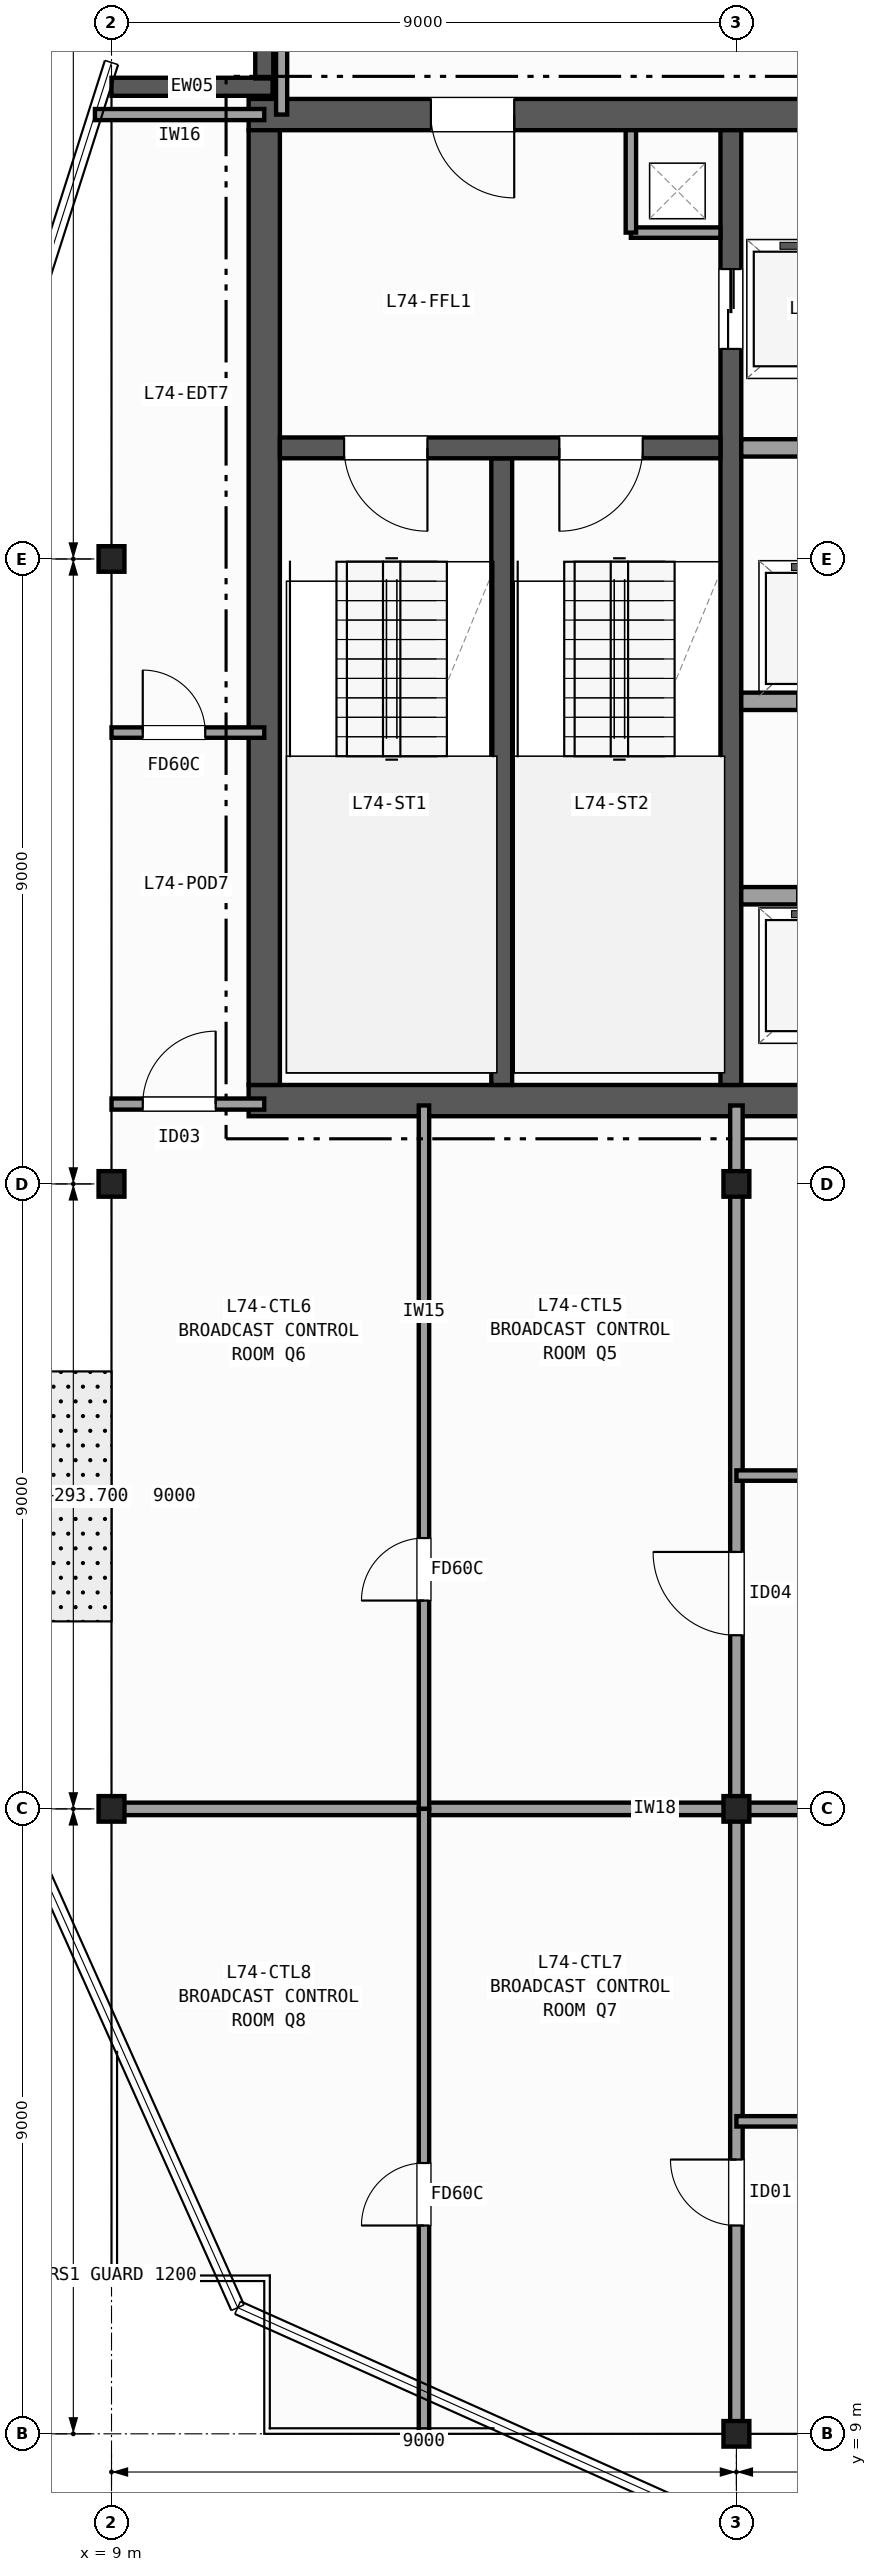
"""IFC4 building model, lengths in metres.
Left out: names, types, materials, properties, quantities, classifications, styles, units other than length and angle.
Written with IfcOpenShell. Run it as: python <this file> out.ifc"""

import sys

from ifc_helpers import new_model, si_unit, direction, frame, frame_2d, origin, origin_2d, place, context, subcontext, project, spatial, rectangle, i_section, extrude, element, fill, save


model = new_model("IFC4")
c1 = context("Model", 3, precision=1e-05, world=origin(), true_north=direction((0.0, 1.0)))
c2 = subcontext(c1, "Body", "Model", "MODEL_VIEW")
j1 = project(units=[si_unit("LENGTHUNIT", "METRE"), si_unit("PLANEANGLEUNIT", "RADIAN")], contexts=[c1])
p1 = place(None, origin())
s1 = spatial("IfcSite", under=j1, at=p1, CompositionType="ELEMENT")
p2 = place(p1, origin())
s2 = spatial("IfcBuilding", under=s1, at=p2, CompositionType="ELEMENT")
p3 = place(p2, frame((0.0, 0.0, 293.7)))
s3 = spatial("IfcBuildingStorey", under=s2, at=p3, CompositionType="ELEMENT", Elevation=293.7)
for number, where, z_axis, x_axis in (
    (1, (9.0, 18.0, 0.0), (0.0, 0.0, 1.0), (1.0, 0.0, 0.0)),
    (2, (9.0, 27.0, 0.0), (0.0, 0.0, 1.0), (1.0, 0.0, 0.0)),
    (3, (9.0, 36.0, 0.0), (0.0, 0.0, 1.0), (1.0, 0.0, 0.0)),
    (4, (18.0, 9.0, 0.0), (0.0, 0.0, 1.0), (1.0, 0.0, 0.0)),
    (5, (18.0, 18.0, 0.0), (0.0, 0.0, 1.0), (1.0, 0.0, 0.0)),
    (6, (18.0, 27.0, 0.0), (0.0, 0.0, 1.0), (1.0, 0.0, 0.0)),
):
    element("IfcColumn", number, at=place(p3, frame(where, z_axis=z_axis, x_axis=x_axis)), inside=s3, PredefinedType="COLUMN", context=c2, shape_type="SweptSolid", body=[
        extrude(i_section(OverallWidth=0.373, OverallDepth=0.368, WebThickness=0.015, FlangeThickness=0.024, FilletRadius=0.015, at=origin_2d()), origin(), (0.0, 0.0, 1.0), 3.7),
    ])
p4 = place(p3, frame((9.0, 42.8, 0.0), z_axis=(0.0, 0.0, 1.0), x_axis=(1.0, 0.0, 0.0)))
e7 = element("IfcWall", 7, at=p4, inside=s3, PredefinedType="SOLIDWALL", context=c2, shape_type="SweptSolid", body=[
    extrude(rectangle(XDim=2.32, YDim=0.26, at=frame_2d((1.16, 0.0))), origin(), (0.0, 0.0, 1.0), 3.37),
])
p5 = place(p3, frame((11.2, 42.92, 0.0), z_axis=(0.0, 0.0, 1.0), x_axis=(0.0, 1.0, 0.0)))
e8 = element("IfcWall", 8, at=p5, inside=s3, PredefinedType="SOLIDWALL", context=c2, shape_type="SweptSolid", body=[
    extrude(rectangle(XDim=2.08, YDim=0.26, at=frame_2d((1.04, 0.0))), origin(), (0.0, 0.0, 1.0), 3.37),
])
p6 = place(p3, frame((10.975, 28.2, 0.0), z_axis=(0.0, 0.0, 1.0), x_axis=(1.0, 0.0, 0.0)))
e9 = element("IfcWall", 9, at=p6, inside=s3, PredefinedType="SHEAR", context=c2, shape_type="SweptSolid", body=[
    extrude(rectangle(XDim=13.85, YDim=0.45, at=frame_2d((6.925, 0.0))), origin(), (0.0, 0.0, 1.0), 3.37),
])
p7 = place(p3, frame((24.825, 42.4, 0.0), z_axis=(0.0, 0.0, 1.0), x_axis=(-1.0, 0.0, 0.0)))
e10 = element("IfcWall", 10, at=p7, inside=s3, PredefinedType="SHEAR", context=c2, shape_type="SweptSolid", body=[
    extrude(rectangle(XDim=13.85, YDim=0.45, at=frame_2d((6.925, 0.0))), origin(), (0.0, 0.0, 1.0), 3.37),
])
p8 = place(p7, frame((10.025, 0.0, 0.0)))
e11 = element("IfcOpeningElement", 11, at=p8, cuts=e10, PredefinedType="OPENING", context=c2, shape_type="SweptSolid", body=[
    extrude(rectangle(XDim=1.2, YDim=2.15, at=frame_2d((0.6, 1.075))), frame((0.0, 0.235, 0.0), z_axis=(0.0, -1.0, 0.0), x_axis=(1.0, 0.0, 0.0)), (0.0, 0.0, 1.0), 0.47),
])
p9 = place(p7, frame((2.975, 0.0, 0.0)))
e12 = element("IfcOpeningElement", 12, at=p9, cuts=e10, PredefinedType="OPENING", context=c2, shape_type="SweptSolid", body=[
    extrude(rectangle(XDim=0.9, YDim=2.1, at=frame_2d((0.45, 1.05))), frame((0.0, 0.235, 0.0), z_axis=(0.0, -1.0, 0.0), x_axis=(1.0, 0.0, 0.0)), (0.0, 0.0, 1.0), 0.47),
])
p10 = place(p3, frame((11.2, 42.175, 0.0), z_axis=(0.0, 0.0, 1.0), x_axis=(0.0, -1.0, 0.0)))
e13 = element("IfcWall", 13, at=p10, inside=s3, PredefinedType="SHEAR", context=c2, shape_type="SweptSolid", body=[
    extrude(rectangle(XDim=13.75, YDim=0.45, at=frame_2d((6.875, 0.0))), origin(), (0.0, 0.0, 1.0), 3.37),
])
p11 = place(p3, frame((14.62, 28.425, 0.0), z_axis=(0.0, 0.0, 1.0), x_axis=(0.0, 1.0, 0.0)))
e14 = element("IfcWall", 14, at=p11, inside=s3, PredefinedType="SHEAR", context=c2, shape_type="SweptSolid", body=[
    extrude(rectangle(XDim=9.025, YDim=0.3, at=frame_2d((4.512, 0.0))), origin(), (0.0, 0.0, 1.0), 3.37),
])
p12 = place(p3, frame((17.92, 42.175, 0.0), z_axis=(0.0, 0.0, 1.0), x_axis=(0.0, -1.0, 0.0)))
e15 = element("IfcWall", 15, at=p12, inside=s3, PredefinedType="SHEAR", context=c2, shape_type="SweptSolid", body=[
    extrude(rectangle(XDim=13.75, YDim=0.3, at=frame_2d((6.875, 0.0))), origin(), (0.0, 0.0, 1.0), 3.37),
])
p13 = place(p12, frame((2.0, 0.0, 0.0)))
e16 = element("IfcOpeningElement", 16, at=p13, cuts=e15, PredefinedType="OPENING", context=c2, shape_type="SweptSolid", body=[
    extrude(rectangle(XDim=1.15, YDim=2.15, at=frame_2d((0.575, 1.075))), frame((0.0, 0.16, 0.0), z_axis=(0.0, -1.0, 0.0), x_axis=(1.0, 0.0, 0.0)), (0.0, 0.0, 1.0), 0.32),
])
p14 = place(p3, frame((17.77, 37.6, 0.0), z_axis=(0.0, 0.0, 1.0), x_axis=(-1.0, 0.0, 0.0)))
e17 = element("IfcWall", 17, at=p14, inside=s3, PredefinedType="SHEAR", context=c2, shape_type="SweptSolid", body=[
    extrude(rectangle(XDim=6.345, YDim=0.3, at=frame_2d((3.172, 0.0))), origin(), (0.0, 0.0, 1.0), 3.37),
])
p15 = place(p14, frame((4.22, 0.0, 0.0)))
e18 = element("IfcOpeningElement", 18, at=p15, cuts=e17, PredefinedType="OPENING", context=c2, shape_type="SweptSolid", body=[
    extrude(rectangle(XDim=1.2, YDim=2.15, at=frame_2d((0.6, 1.075))), frame((0.0, 0.16, 0.0), z_axis=(0.0, -1.0, 0.0), x_axis=(1.0, 0.0, 0.0)), (0.0, 0.0, 1.0), 0.32),
])
p16 = place(p14, frame((1.12, 0.0, 0.0)))
e19 = element("IfcOpeningElement", 19, at=p16, cuts=e17, PredefinedType="OPENING", context=c2, shape_type="SweptSolid", body=[
    extrude(rectangle(XDim=1.2, YDim=2.15, at=frame_2d((0.6, 1.075))), frame((0.0, 0.16, 0.0), z_axis=(0.0, -1.0, 0.0), x_axis=(1.0, 0.0, 0.0)), (0.0, 0.0, 1.0), 0.32),
])
p17 = place(p3, frame((16.48, 40.7, 0.0), z_axis=(0.0, 0.0, 1.0), x_axis=(1.0, 0.0, 0.0)))
e20 = element("IfcWall", 20, at=p17, inside=s3, PredefinedType="PARTITIONING", context=c2, shape_type="SweptSolid", body=[
    extrude(rectangle(XDim=1.29, YDim=0.15, at=frame_2d((0.645, 0.0))), origin(), (0.0, 0.0, 1.0), 3.37),
])
p18 = place(p3, frame((16.48, 40.7, 0.0), z_axis=(0.0, 0.0, 1.0), x_axis=(0.0, 1.0, 0.0)))
e21 = element("IfcWall", 21, at=p18, inside=s3, PredefinedType="PARTITIONING", context=c2, shape_type="SweptSolid", body=[
    extrude(rectangle(XDim=1.475, YDim=0.15, at=frame_2d((0.738, 0.0))), origin(), (0.0, 0.0, 1.0), 3.37),
])
p19 = place(p3, frame((18.07, 37.6, 0.0), z_axis=(0.0, 0.0, 1.0), x_axis=(1.0, 0.0, 0.0)))
e22 = element("IfcWall", 22, at=p19, inside=s3, PredefinedType="PARTITIONING", context=c2, shape_type="SweptSolid", body=[
    extrude(rectangle(XDim=6.305, YDim=0.25, at=frame_2d((3.152, 0.0))), origin(), (0.0, 0.0, 1.0), 3.37),
])
p20 = place(p3, frame((18.07, 31.15, 0.0), z_axis=(0.0, 0.0, 1.0), x_axis=(1.0, 0.0, 0.0)))
e23 = element("IfcWall", 23, at=p20, inside=s3, PredefinedType="PARTITIONING", context=c2, shape_type="SweptSolid", body=[
    extrude(rectangle(XDim=6.305, YDim=0.25, at=frame_2d((3.152, 0.0))), origin(), (0.0, 0.0, 1.0), 3.37),
])
p21 = place(p20, frame((0.805, 0.0, 0.0)))
e24 = element("IfcOpeningElement", 24, at=p21, cuts=e23, PredefinedType="OPENING", context=c2, shape_type="SweptSolid", body=[
    extrude(rectangle(XDim=1.15, YDim=2.15, at=frame_2d((0.575, 1.075))), frame((0.0, 0.135, 0.0), z_axis=(0.0, -1.0, 0.0), x_axis=(1.0, 0.0, 0.0)), (0.0, 0.0, 1.0), 0.27),
])
p22 = place(p20, frame((3.355, 0.0, 0.0)))
e25 = element("IfcOpeningElement", 25, at=p22, cuts=e23, PredefinedType="OPENING", context=c2, shape_type="SweptSolid", body=[
    extrude(rectangle(XDim=1.15, YDim=2.15, at=frame_2d((0.575, 1.075))), frame((0.0, 0.135, 0.0), z_axis=(0.0, -1.0, 0.0), x_axis=(1.0, 0.0, 0.0)), (0.0, 0.0, 1.0), 0.27),
])
p23 = place(p3, frame((24.375, 33.95, 0.0), z_axis=(0.0, 0.0, 1.0), x_axis=(-1.0, 0.0, 0.0)))
e26 = element("IfcWall", 26, at=p23, inside=s3, PredefinedType="PARTITIONING", context=c2, shape_type="SweptSolid", body=[
    extrude(rectangle(XDim=6.305, YDim=0.25, at=frame_2d((3.152, 0.0))), origin(), (0.0, 0.0, 1.0), 3.37),
])
p24 = place(p23, frame((4.35, 0.0, 0.0)))
e27 = element("IfcOpeningElement", 27, at=p24, cuts=e26, PredefinedType="OPENING", context=c2, shape_type="SweptSolid", body=[
    extrude(rectangle(XDim=1.15, YDim=2.15, at=frame_2d((0.575, 1.075))), frame((0.0, 0.135, 0.0), z_axis=(0.0, -1.0, 0.0), x_axis=(1.0, 0.0, 0.0)), (0.0, 0.0, 1.0), 0.27),
])
p25 = place(p23, frame((1.8, 0.0, 0.0)))
e28 = element("IfcOpeningElement", 28, at=p25, cuts=e26, PredefinedType="OPENING", context=c2, shape_type="SweptSolid", body=[
    extrude(rectangle(XDim=1.15, YDim=2.15, at=frame_2d((0.575, 1.075))), frame((0.0, 0.135, 0.0), z_axis=(0.0, -1.0, 0.0), x_axis=(1.0, 0.0, 0.0)), (0.0, 0.0, 1.0), 0.27),
])
p26 = place(p3, frame((9.0, 28.15, 0.0), z_axis=(0.0, 0.0, 1.0), x_axis=(1.0, 0.0, 0.0)))
e29 = element("IfcWall", 29, at=p26, inside=s3, PredefinedType="PARTITIONING", context=c2, shape_type="SweptSolid", body=[
    extrude(rectangle(XDim=2.2, YDim=0.16, at=frame_2d((1.1, 0.0))), origin(), (0.0, 0.0, 1.0), 2.657),
])
p27 = place(p26, frame((0.45, 0.0, 0.0)))
e30 = element("IfcOpeningElement", 30, at=p27, cuts=e29, PredefinedType="OPENING", context=c2, shape_type="SweptSolid", body=[
    extrude(rectangle(XDim=1.05, YDim=2.15, at=frame_2d((0.525, 1.075))), frame((0.0, 0.09, 0.0), z_axis=(0.0, -1.0, 0.0), x_axis=(1.0, 0.0, 0.0)), (0.0, 0.0, 1.0), 0.18),
])
p28 = place(p3, frame((8.761, 42.4, 0.0), z_axis=(0.0, 0.0, 1.0), x_axis=(1.0, 0.0, 0.0)))
e31 = element("IfcWall", 31, at=p28, inside=s3, PredefinedType="PARTITIONING", context=c2, shape_type="SweptSolid", body=[
    extrude(rectangle(XDim=2.439, YDim=0.16, at=frame_2d((1.219, 0.0))), origin(), (0.0, 0.0, 1.0), 3.37),
])
p29 = place(p3, frame((11.45, 42.4, 0.0), z_axis=(0.0, 0.0, 1.0), x_axis=(0.0, 1.0, 0.0)))
e32 = element("IfcWall", 32, at=p29, inside=s3, PredefinedType="PARTITIONING", context=c2, shape_type="SweptSolid", body=[
    extrude(rectangle(XDim=2.666, YDim=0.16, at=frame_2d((1.333, 0.0))), origin(), (0.0, 0.0, 1.0), 3.37),
])
p30 = place(p3, frame((9.0, 33.5, 0.0), z_axis=(0.0, 0.0, 1.0), x_axis=(1.0, 0.0, 0.0)))
e33 = element("IfcWall", 33, at=p30, inside=s3, PredefinedType="PARTITIONING", context=c2, shape_type="SweptSolid", body=[
    extrude(rectangle(XDim=2.2, YDim=0.15, at=frame_2d((1.1, 0.0))), origin(), (0.0, 0.0, 1.0), 2.657),
])
p31 = place(p30, frame((0.45, 0.0, 0.0)))
e34 = element("IfcOpeningElement", 34, at=p31, cuts=e33, PredefinedType="OPENING", context=c2, shape_type="SweptSolid", body=[
    extrude(rectangle(XDim=0.9, YDim=2.1, at=frame_2d((0.45, 1.05))), frame((0.0, 0.085, 0.0), z_axis=(0.0, -1.0, 0.0), x_axis=(1.0, 0.0, 0.0)), (0.0, 0.0, 1.0), 0.17),
])
p32 = place(p3, frame((9.0, 18.0, 0.0), z_axis=(0.0, 0.0, 1.0), x_axis=(1.0, 0.0, 0.0)))
e35 = element("IfcWall", 35, at=p32, inside=s3, PredefinedType="PARTITIONING", context=c2, shape_type="SweptSolid", body=[
    extrude(rectangle(XDim=15.65, YDim=0.18, at=frame_2d((7.825, 0.0))), origin(), (0.0, 0.0, 1.0), 2.657),
])
p33 = place(p3, frame((18.0, 9.0, 0.0), z_axis=(0.0, 0.0, 1.0), x_axis=(0.0, 1.0, 0.0)))
e36 = element("IfcWall", 36, at=p33, inside=s3, PredefinedType="PARTITIONING", context=c2, shape_type="SweptSolid", body=[
    extrude(rectangle(XDim=19.13, YDim=0.18, at=frame_2d((9.565, 0.0))), origin(), (0.0, 0.0, 1.0), 2.657),
])
p34 = place(p33, frame((11.5, 0.0, 0.0)))
e37 = element("IfcOpeningElement", 37, at=p34, cuts=e36, PredefinedType="OPENING", context=c2, shape_type="SweptSolid", body=[
    extrude(rectangle(XDim=1.2, YDim=2.15, at=frame_2d((0.6, 1.075))), frame((0.0, 0.1, 0.0), z_axis=(0.0, -1.0, 0.0), x_axis=(1.0, 0.0, 0.0)), (0.0, 0.0, 1.0), 0.2),
])
p35 = place(p33, frame((3.0, 0.0, 0.0)))
e38 = element("IfcOpeningElement", 38, at=p35, cuts=e36, PredefinedType="OPENING", context=c2, shape_type="SweptSolid", body=[
    extrude(rectangle(XDim=0.95, YDim=2.1, at=frame_2d((0.475, 1.05))), frame((0.0, 0.1, 0.0), z_axis=(0.0, -1.0, 0.0), x_axis=(1.0, 0.0, 0.0)), (0.0, 0.0, 1.0), 0.2),
])
p36 = place(p3, frame((13.5, 18.0, 0.0), z_axis=(0.0, 0.0, 1.0), x_axis=(0.0, 1.0, 0.0)))
e39 = element("IfcWall", 39, at=p36, inside=s3, PredefinedType="PARTITIONING", context=c2, shape_type="SweptSolid", body=[
    extrude(rectangle(XDim=10.13, YDim=0.15, at=frame_2d((5.065, 0.0))), origin(), (0.0, 0.0, 1.0), 2.739),
])
p37 = place(p36, frame((3.0, 0.0, 0.0)))
e40 = element("IfcOpeningElement", 40, at=p37, cuts=e39, PredefinedType="OPENING", context=c2, shape_type="SweptSolid", body=[
    extrude(rectangle(XDim=0.9, YDim=2.1, at=frame_2d((0.45, 1.05))), frame((0.0, 0.085, 0.0), z_axis=(0.0, -1.0, 0.0), x_axis=(1.0, 0.0, 0.0)), (0.0, 0.0, 1.0), 0.17),
])
p38 = place(p3, frame((13.5, 9.0, 0.0), z_axis=(0.0, 0.0, 1.0), x_axis=(0.0, 1.0, 0.0)))
e41 = element("IfcWall", 41, at=p38, inside=s3, PredefinedType="PARTITIONING", context=c2, shape_type="SweptSolid", body=[
    extrude(rectangle(XDim=9.0, YDim=0.15, at=frame_2d((4.5, 0.0))), origin(), (0.0, 0.0, 1.0), 2.739),
])
p39 = place(p38, frame((3.0, 0.0, 0.0)))
e42 = element("IfcOpeningElement", 42, at=p39, cuts=e41, PredefinedType="OPENING", context=c2, shape_type="SweptSolid", body=[
    extrude(rectangle(XDim=0.9, YDim=2.1, at=frame_2d((0.45, 1.05))), frame((0.0, 0.085, 0.0), z_axis=(0.0, -1.0, 0.0), x_axis=(1.0, 0.0, 0.0)), (0.0, 0.0, 1.0), 0.17),
])
for number, where, z_axis, x_axis in (
    (43, (18.0, 22.8, 0.0), (0.0, 0.0, 1.0), (1.0, 0.0, 0.0)),
    (44, (18.0, 13.5, 0.0), (0.0, 0.0, 1.0), (1.0, 0.0, 0.0)),
):
    element("IfcWall", number, at=place(p3, frame(where, z_axis=z_axis, x_axis=x_axis)), inside=s3, PredefinedType="PARTITIONING", context=c2, shape_type="SweptSolid", body=[
        extrude(rectangle(XDim=6.65, YDim=0.15, at=frame_2d((3.325, 0.0))), origin(), (0.0, 0.0, 1.0), 2.742),
    ])
p40 = place(p15, origin())
e45 = element("IfcDoor", 45, at=p40, inside=s3, OperationType="SINGLE_SWING_LEFT", PredefinedType="DOOR", context=c2, shape_type="SweptSolid", body=[
    extrude(rectangle(XDim=1.2, YDim=2.15, at=frame_2d((0.6, 1.075))), frame((0.0, 0.025, 0.0), z_axis=(0.0, -1.0, 0.0), x_axis=(1.0, 0.0, 0.0)), (0.0, 0.0, 1.0), 0.05),
])
fill(e18, e45)
p41 = place(p16, origin())
e46 = element("IfcDoor", 46, at=p41, inside=s3, OperationType="SINGLE_SWING_RIGHT", PredefinedType="DOOR", context=c2, shape_type="SweptSolid", body=[
    extrude(rectangle(XDim=1.2, YDim=2.15, at=frame_2d((0.6, 1.075))), frame((0.0, 0.025, 0.0), z_axis=(0.0, -1.0, 0.0), x_axis=(1.0, 0.0, 0.0)), (0.0, 0.0, 1.0), 0.05),
])
fill(e19, e46)
p42 = place(p8, origin())
e47 = element("IfcDoor", 47, at=p42, inside=s3, OperationType="SINGLE_SWING_LEFT", PredefinedType="DOOR", context=c2, shape_type="SweptSolid", body=[
    extrude(rectangle(XDim=1.2, YDim=2.15, at=frame_2d((0.6, 1.075))), frame((0.0, 0.025, 0.0), z_axis=(0.0, -1.0, 0.0), x_axis=(1.0, 0.0, 0.0)), (0.0, 0.0, 1.0), 0.05),
])
fill(e11, e47)
p43 = place(p13, origin())
e48 = element("IfcDoor", 48, at=p43, inside=s3, OperationType="DOUBLE_DOOR_SLIDING", PredefinedType="DOOR", context=c2, shape_type="SweptSolid", body=[
    extrude(rectangle(XDim=1.15, YDim=2.15, at=frame_2d((0.575, 1.075))), frame((0.0, 0.025, 0.0), z_axis=(0.0, -1.0, 0.0), x_axis=(1.0, 0.0, 0.0)), (0.0, 0.0, 1.0), 0.05),
])
fill(e16, e48)
p44 = place(p21, origin())
e49 = element("IfcDoor", 49, at=p44, inside=s3, OperationType="DOUBLE_DOOR_SLIDING", PredefinedType="DOOR", context=c2, shape_type="SweptSolid", body=[
    extrude(rectangle(XDim=1.15, YDim=2.15, at=frame_2d((0.575, 1.075))), frame((0.0, 0.025, 0.0), z_axis=(0.0, -1.0, 0.0), x_axis=(1.0, 0.0, 0.0)), (0.0, 0.0, 1.0), 0.05),
])
fill(e24, e49)
p45 = place(p24, origin())
e50 = element("IfcDoor", 50, at=p45, inside=s3, OperationType="DOUBLE_DOOR_SLIDING", PredefinedType="DOOR", context=c2, shape_type="SweptSolid", body=[
    extrude(rectangle(XDim=1.15, YDim=2.15, at=frame_2d((0.575, 1.075))), frame((0.0, 0.025, 0.0), z_axis=(0.0, -1.0, 0.0), x_axis=(1.0, 0.0, 0.0)), (0.0, 0.0, 1.0), 0.05),
])
fill(e27, e50)
p46 = place(p27, origin())
e51 = element("IfcDoor", 51, at=p46, inside=s3, OperationType="SINGLE_SWING_RIGHT", PredefinedType="DOOR", context=c2, shape_type="SweptSolid", body=[
    extrude(rectangle(XDim=1.05, YDim=2.15, at=frame_2d((0.525, 1.075))), frame((0.0, 0.025, 0.0), z_axis=(0.0, -1.0, 0.0), x_axis=(1.0, 0.0, 0.0)), (0.0, 0.0, 1.0), 0.05),
])
fill(e30, e51)
p47 = place(p31, origin())
e52 = element("IfcDoor", 52, at=p47, inside=s3, OperationType="SINGLE_SWING_LEFT", PredefinedType="DOOR", context=c2, shape_type="SweptSolid", body=[
    extrude(rectangle(XDim=0.9, YDim=2.1, at=frame_2d((0.45, 1.05))), frame((0.0, 0.025, 0.0), z_axis=(0.0, -1.0, 0.0), x_axis=(1.0, 0.0, 0.0)), (0.0, 0.0, 1.0), 0.05),
])
fill(e34, e52)
p48 = place(p34, origin())
e53 = element("IfcDoor", 53, at=p48, inside=s3, OperationType="SINGLE_SWING_RIGHT", PredefinedType="DOOR", context=c2, shape_type="SweptSolid", body=[
    extrude(rectangle(XDim=1.2, YDim=2.15, at=frame_2d((0.6, 1.075))), frame((0.0, 0.025, 0.0), z_axis=(0.0, -1.0, 0.0), x_axis=(1.0, 0.0, 0.0)), (0.0, 0.0, 1.0), 0.05),
])
fill(e37, e53)
p49 = place(p37, origin())
e54 = element("IfcDoor", 54, at=p49, inside=s3, OperationType="SINGLE_SWING_LEFT", PredefinedType="DOOR", context=c2, shape_type="SweptSolid", body=[
    extrude(rectangle(XDim=0.9, YDim=2.1, at=frame_2d((0.45, 1.05))), frame((0.0, 0.025, 0.0), z_axis=(0.0, -1.0, 0.0), x_axis=(1.0, 0.0, 0.0)), (0.0, 0.0, 1.0), 0.05),
])
fill(e40, e54)
p50 = place(p35, origin())
e55 = element("IfcDoor", 55, at=p50, inside=s3, OperationType="SINGLE_SWING_RIGHT", PredefinedType="DOOR", context=c2, shape_type="SweptSolid", body=[
    extrude(rectangle(XDim=0.95, YDim=2.1, at=frame_2d((0.475, 1.05))), frame((0.0, 0.025, 0.0), z_axis=(0.0, -1.0, 0.0), x_axis=(1.0, 0.0, 0.0)), (0.0, 0.0, 1.0), 0.05),
])
fill(e38, e55)
p51 = place(p39, origin())
e56 = element("IfcDoor", 56, at=p51, inside=s3, OperationType="SINGLE_SWING_LEFT", PredefinedType="DOOR", context=c2, shape_type="SweptSolid", body=[
    extrude(rectangle(XDim=0.9, YDim=2.1, at=frame_2d((0.45, 1.05))), frame((0.0, 0.025, 0.0), z_axis=(0.0, -1.0, 0.0), x_axis=(1.0, 0.0, 0.0)), (0.0, 0.0, 1.0), 0.05),
])
fill(e42, e56)
save(model, sys.argv[1])
